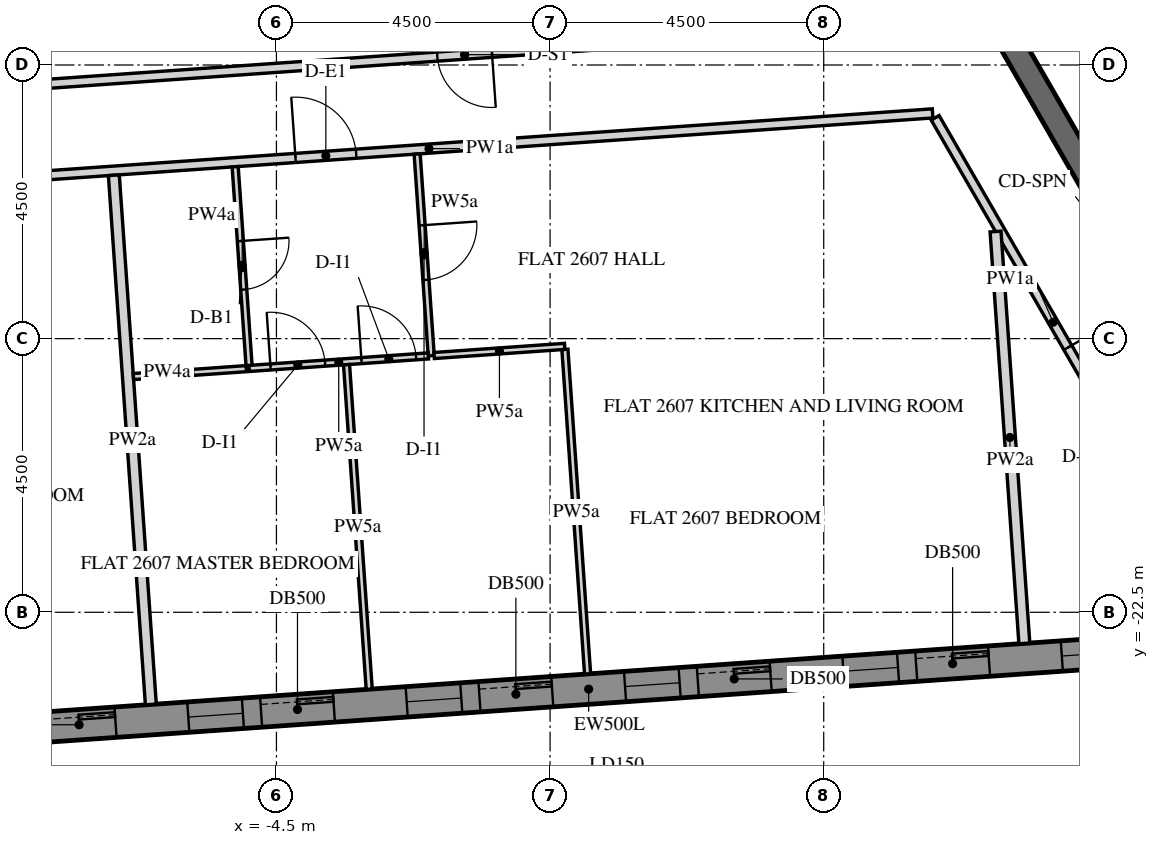
"""IFC4 building model, lengths in metres.
Left out: names, types, materials, properties, quantities, classifications, styles, units other than length and angle.
Written with IfcOpenShell. Run it as: python <this file> out.ifc"""

import sys

from ifc_helpers import new_model, si_unit, direction, frame, frame_2d, origin, place, context, subcontext, project, spatial, polyline, rectangle, outline, extrude, element, fill, save


model = new_model("IFC4")
c1 = context("Model", 3, precision=1e-05, world=origin(), true_north=direction((0.0, 1.0)))
c2 = subcontext(c1, "Body", "Model", "MODEL_VIEW")
j1 = project(units=[si_unit("LENGTHUNIT", "METRE"), si_unit("PLANEANGLEUNIT", "RADIAN")], contexts=[c1])
p1 = place(None, origin())
s1 = spatial("IfcSite", under=j1, at=p1, CompositionType="ELEMENT")
p2 = place(p1, origin())
s2 = spatial("IfcBuilding", under=s1, at=p2, CompositionType="ELEMENT")
p3 = place(p2, frame((0.0, 0.0, 326.4)))
s3 = spatial("IfcBuildingStorey", under=s2, at=p3, CompositionType="ELEMENT", Elevation=326.4)
p4 = place(p3, frame((-10.86, -24.567, -0.15), z_axis=(0.0, 0.0, 1.0), x_axis=(0.997564329317, 0.06975248292, 0.0)))
e1 = element("IfcWall", 1, at=p4, inside=s3, PredefinedType="SOLIDWALL", context=c2, shape_type="SweptSolid", body=[
    extrude(outline(polyline([(0.25, -0.25), (22.795, -0.25), (23.295, 0.25), (-0.25, 0.25), (0.25, -0.25)])), origin(), (0.0, 0.0, 1.0), 3.9),
])
p5 = place(p4, frame((1.323, 0.0, 1.05)))
e2 = element("IfcOpeningElement", 2, at=p5, cuts=e1, PredefinedType="OPENING", context=c2, shape_type="SweptSolid", body=[
    extrude(rectangle(XDim=0.9, YDim=1.5, at=frame_2d((0.45, 0.75))), frame((0.0, 0.26, 0.0), z_axis=(0.0, -1.0, 0.0), x_axis=(1.0, 0.0, 0.0)), (0.0, 0.0, 1.0), 0.52),
])
p6 = place(p4, frame((2.522, 0.0, 0.15)))
e3 = element("IfcOpeningElement", 3, at=p6, cuts=e1, PredefinedType="OPENING", context=c2, shape_type="SweptSolid", body=[
    extrude(rectangle(XDim=1.2, YDim=2.4, at=frame_2d((0.6, 1.2))), frame((0.0, 0.26, 0.0), z_axis=(0.0, -1.0, 0.0), x_axis=(1.0, 0.0, 0.0)), (0.0, 0.0, 1.0), 0.52),
])
p7 = place(p4, frame((4.922, 0.0, 1.05)))
e4 = element("IfcOpeningElement", 4, at=p7, cuts=e1, PredefinedType="OPENING", context=c2, shape_type="SweptSolid", body=[
    extrude(rectangle(XDim=0.9, YDim=1.5, at=frame_2d((0.45, 0.75))), frame((0.0, 0.26, 0.0), z_axis=(0.0, -1.0, 0.0), x_axis=(1.0, 0.0, 0.0)), (0.0, 0.0, 1.0), 0.52),
])
p8 = place(p4, frame((6.122, 0.0, 0.15)))
e5 = element("IfcOpeningElement", 5, at=p8, cuts=e1, PredefinedType="OPENING", context=c2, shape_type="SweptSolid", body=[
    extrude(rectangle(XDim=1.2, YDim=2.4, at=frame_2d((0.6, 1.2))), frame((0.0, 0.26, 0.0), z_axis=(0.0, -1.0, 0.0), x_axis=(1.0, 0.0, 0.0)), (0.0, 0.0, 1.0), 0.52),
])
p9 = place(p4, frame((8.522, 0.0, 1.05)))
e6 = element("IfcOpeningElement", 6, at=p9, cuts=e1, PredefinedType="OPENING", context=c2, shape_type="SweptSolid", body=[
    extrude(rectangle(XDim=0.9, YDim=1.5, at=frame_2d((0.45, 0.75))), frame((0.0, 0.26, 0.0), z_axis=(0.0, -1.0, 0.0), x_axis=(1.0, 0.0, 0.0)), (0.0, 0.0, 1.0), 0.52),
])
p10 = place(p4, frame((9.722, 0.0, 0.15)))
e7 = element("IfcOpeningElement", 7, at=p10, cuts=e1, PredefinedType="OPENING", context=c2, shape_type="SweptSolid", body=[
    extrude(rectangle(XDim=1.2, YDim=2.4, at=frame_2d((0.6, 1.2))), frame((0.0, 0.26, 0.0), z_axis=(0.0, -1.0, 0.0), x_axis=(1.0, 0.0, 0.0)), (0.0, 0.0, 1.0), 0.52),
])
p11 = place(p4, frame((12.122, 0.0, 1.05)))
e8 = element("IfcOpeningElement", 8, at=p11, cuts=e1, PredefinedType="OPENING", context=c2, shape_type="SweptSolid", body=[
    extrude(rectangle(XDim=0.9, YDim=1.5, at=frame_2d((0.45, 0.75))), frame((0.0, 0.26, 0.0), z_axis=(0.0, -1.0, 0.0), x_axis=(1.0, 0.0, 0.0)), (0.0, 0.0, 1.0), 0.52),
])
p12 = place(p4, frame((13.323, 0.0, 0.15)))
e9 = element("IfcOpeningElement", 9, at=p12, cuts=e1, PredefinedType="OPENING", context=c2, shape_type="SweptSolid", body=[
    extrude(rectangle(XDim=1.2, YDim=2.4, at=frame_2d((0.6, 1.2))), frame((0.0, 0.26, 0.0), z_axis=(0.0, -1.0, 0.0), x_axis=(1.0, 0.0, 0.0)), (0.0, 0.0, 1.0), 0.52),
])
p13 = place(p4, frame((15.722, 0.0, 1.05)))
e10 = element("IfcOpeningElement", 10, at=p13, cuts=e1, PredefinedType="OPENING", context=c2, shape_type="SweptSolid", body=[
    extrude(rectangle(XDim=0.9, YDim=1.5, at=frame_2d((0.45, 0.75))), frame((0.0, 0.26, 0.0), z_axis=(0.0, -1.0, 0.0), x_axis=(1.0, 0.0, 0.0)), (0.0, 0.0, 1.0), 0.52),
])
p14 = place(p4, frame((16.922, 0.0, 0.15)))
e11 = element("IfcOpeningElement", 11, at=p14, cuts=e1, PredefinedType="OPENING", context=c2, shape_type="SweptSolid", body=[
    extrude(rectangle(XDim=1.2, YDim=2.4, at=frame_2d((0.6, 1.2))), frame((0.0, 0.26, 0.0), z_axis=(0.0, -1.0, 0.0), x_axis=(1.0, 0.0, 0.0)), (0.0, 0.0, 1.0), 0.52),
])
p15 = place(p4, frame((19.323, 0.0, 1.05)))
e12 = element("IfcOpeningElement", 12, at=p15, cuts=e1, PredefinedType="OPENING", context=c2, shape_type="SweptSolid", body=[
    extrude(rectangle(XDim=0.9, YDim=1.5, at=frame_2d((0.45, 0.75))), frame((0.0, 0.26, 0.0), z_axis=(0.0, -1.0, 0.0), x_axis=(1.0, 0.0, 0.0)), (0.0, 0.0, 1.0), 0.52),
])
p16 = place(p4, frame((20.522, 0.0, 0.15)))
e13 = element("IfcOpeningElement", 13, at=p16, cuts=e1, PredefinedType="OPENING", context=c2, shape_type="SweptSolid", body=[
    extrude(rectangle(XDim=1.2, YDim=2.4, at=frame_2d((0.6, 1.2))), frame((0.0, 0.26, 0.0), z_axis=(0.0, -1.0, 0.0), x_axis=(1.0, 0.0, 0.0)), (0.0, 0.0, 1.0), 0.52),
])
p17 = place(p3, frame((6.351, -11.0, -0.15), z_axis=(0.0, 0.0, 1.0), x_axis=(0.499998894578, -0.866026041999, 0.0)))
e14 = element("IfcWall", 14, at=p17, inside=s3, PredefinedType="SHEAR", context=c2, shape_type="SweptSolid", body=[
    extrude(rectangle(XDim=15.544, YDim=0.4, at=frame_2d((7.772, 0.0))), origin(), (0.0, 0.0, 1.0), 3.9),
])
p18 = place(p17, frame((6.872, 0.0, 0.15)))
e15 = element("IfcOpeningElement", 15, at=p18, cuts=e14, PredefinedType="OPENING", context=c2, shape_type="SweptSolid", body=[
    extrude(rectangle(XDim=1.8, YDim=2.4, at=frame_2d((0.9, 1.2))), frame((0.0, 0.21, 0.0), z_axis=(0.0, -1.0, 0.0), x_axis=(1.0, 0.0, 0.0)), (0.0, 0.0, 1.0), 0.42),
])
p19 = place(p3, frame((-10.274, -15.454, 0.0), z_axis=(0.0, 0.0, 1.0), x_axis=(0.997563645223, 0.069762265797, 0.0)))
e16 = element("IfcWall", 16, at=p19, inside=s3, PredefinedType="PARTITIONING", context=c2, shape_type="SweptSolid", body=[
    extrude(rectangle(XDim=16.606, YDim=0.15, at=frame_2d((8.303, 0.0))), origin(), (0.0, 0.0, 1.0), 2.838),
])
p20 = place(p19, frame((6.103, 0.0, 0.0)))
e17 = element("IfcOpeningElement", 17, at=p20, cuts=e16, PredefinedType="OPENING", context=c2, shape_type="SweptSolid", body=[
    extrude(rectangle(XDim=1.0, YDim=2.1, at=frame_2d((0.5, 1.05))), frame((0.0, 0.085, 0.0), z_axis=(0.0, -1.0, 0.0), x_axis=(1.0, 0.0, 0.0)), (0.0, 0.0, 1.0), 0.17),
])
p21 = place(p3, frame((6.333, -14.368, 0.0), z_axis=(0.0, 0.0, 1.0), x_axis=(0.499977396983, -0.866038453249, 0.0)))
e18 = element("IfcWall", 18, at=p21, inside=s3, PredefinedType="PARTITIONING", context=c2, shape_type="SweptSolid", body=[
    extrude(rectangle(XDim=7.764, YDim=0.15, at=frame_2d((3.882, 0.0))), origin(), (0.0, 0.0, 1.0), 2.838),
])
p22 = place(p21, frame((4.364, 0.0, 0.0)))
e19 = element("IfcOpeningElement", 19, at=p22, cuts=e18, PredefinedType="OPENING", context=c2, shape_type="SweptSolid", body=[
    extrude(rectangle(XDim=1.0, YDim=2.1, at=frame_2d((0.5, 1.05))), frame((0.0, 0.085, 0.0), z_axis=(0.0, -1.0, 0.0), x_axis=(1.0, 0.0, 0.0)), (0.0, 0.0, 1.0), 0.17),
])
p23 = place(p3, frame((6.717, -12.762, 0.0), z_axis=(0.0, 0.0, 1.0), x_axis=(-0.99756375843, -0.069760646978, 0.0)))
e20 = element("IfcWall", 20, at=p23, inside=s3, PredefinedType="PARTITIONING", context=c2, shape_type="SweptSolid", body=[
    extrude(rectangle(XDim=16.284, YDim=0.15, at=frame_2d((8.142, 0.0))), origin(), (0.0, 0.0, 1.0), 2.838),
])
p24 = place(p23, frame((7.692, 0.0, 0.0)))
e21 = element("IfcOpeningElement", 21, at=p24, cuts=e20, PredefinedType="OPENING", context=c2, shape_type="SweptSolid", body=[
    extrude(rectangle(XDim=0.9, YDim=2.1, at=frame_2d((0.45, 1.05))), frame((0.0, 0.085, 0.0), z_axis=(0.0, -1.0, 0.0), x_axis=(1.0, 0.0, 0.0)), (0.0, 0.0, 1.0), 0.17),
])
p25 = place(p3, frame((-6.565, -24.017, 0.0), z_axis=(0.0, 0.0, 1.0), x_axis=(-0.06975756604, 0.997563973878, 0.0)))
e22 = element("IfcWall", 22, at=p25, inside=s3, PredefinedType="PARTITIONING", context=c2, shape_type="SweptSolid", body=[
    extrude(rectangle(XDim=8.725, YDim=0.18, at=frame_2d((4.363, 0.0))), origin(), (0.0, 0.0, 1.0), 2.838),
])
p26 = place(p3, frame((-2.186, -14.964, 0.0), z_axis=(0.0, 0.0, 1.0), x_axis=(0.069754598287, -0.997564181403, 0.0)))
e23 = element("IfcWall", 23, at=p26, inside=s3, PredefinedType="PARTITIONING", context=c2, shape_type="SweptSolid", body=[
    extrude(rectangle(XDim=3.325, YDim=0.1, at=frame_2d((1.663, 0.0))), origin(), (0.0, 0.0, 1.0), 2.838),
])
p27 = place(p26, frame((1.175, 0.0, 0.0)))
e24 = element("IfcOpeningElement", 24, at=p27, cuts=e23, PredefinedType="OPENING", context=c2, shape_type="SweptSolid", body=[
    extrude(rectangle(XDim=0.9, YDim=2.1, at=frame_2d((0.45, 1.05))), frame((0.0, 0.06, 0.0), z_axis=(0.0, -1.0, 0.0), x_axis=(1.0, 0.0, 0.0)), (0.0, 0.0, 1.0), 0.12),
])
p28 = place(p3, frame((-1.906, -18.278, 0.0), z_axis=(0.0, 0.0, 1.0), x_axis=(0.997563548072, 0.069763654999, 0.0)))
e25 = element("IfcWall", 25, at=p28, inside=s3, PredefinedType="PARTITIONING", context=c2, shape_type="SweptSolid", body=[
    extrude(rectangle(XDim=2.152, YDim=0.1, at=frame_2d((1.076, 0.0))), origin(), (0.0, 0.0, 1.0), 2.838),
])
p29 = place(p3, frame((0.244, -18.177, 0.0), z_axis=(0.0, 0.0, 1.0), x_axis=(0.069729221413, -0.997565955554, 0.0)))
e26 = element("IfcWall", 26, at=p29, inside=s3, PredefinedType="PARTITIONING", context=c2, shape_type="SweptSolid", body=[
    extrude(rectangle(XDim=5.35, YDim=0.1, at=frame_2d((2.675, 0.0))), origin(), (0.0, 0.0, 1.0), 2.838),
])
p30 = place(p3, frame((7.8, -23.012, 0.0), z_axis=(0.0, 0.0, 1.0), x_axis=(-0.069757205717, 0.997563999075, 0.0)))
e27 = element("IfcWall", 27, at=p30, inside=s3, PredefinedType="PARTITIONING", context=c2, shape_type="SweptSolid", body=[
    extrude(rectangle(XDim=6.79, YDim=0.18, at=frame_2d((3.395, 0.0))), origin(), (0.0, 0.0, 1.0), 2.838),
])
p31 = place(p3, frame((-5.179, -15.173, 0.0), z_axis=(0.0, 0.0, 1.0), x_axis=(0.069754598287, -0.997564181403, 0.0)))
e28 = element("IfcWall", 28, at=p31, inside=s3, PredefinedType="PARTITIONING", context=c2, shape_type="SweptSolid", body=[
    extrude(rectangle(XDim=3.325, YDim=0.1, at=frame_2d((1.663, 0.0))), origin(), (0.0, 0.0, 1.0), 2.838),
])
p32 = place(p31, frame((1.225, 0.0, 0.0)))
e29 = element("IfcOpeningElement", 29, at=p32, cuts=e28, PredefinedType="OPENING", context=c2, shape_type="SweptSolid", body=[
    extrude(rectangle(XDim=0.8, YDim=2.1, at=frame_2d((0.4, 1.05))), frame((0.0, 0.06, 0.0), z_axis=(0.0, -1.0, 0.0), x_axis=(1.0, 0.0, 0.0)), (0.0, 0.0, 1.0), 0.12),
])
p33 = place(p3, frame((-4.949, -18.49, 0.0), z_axis=(0.0, 0.0, 1.0), x_axis=(0.997564145845, 0.069755106801, 0.0)))
e30 = element("IfcWall", 30, at=p33, inside=s3, PredefinedType="PARTITIONING", context=c2, shape_type="SweptSolid", body=[
    extrude(rectangle(XDim=2.954, YDim=0.1, at=frame_2d((1.477, 0.0))), origin(), (0.0, 0.0, 1.0), 2.838),
])
p34 = place(p33, frame((0.352, 0.0, 0.0)))
e31 = element("IfcOpeningElement", 31, at=p34, cuts=e30, PredefinedType="OPENING", context=c2, shape_type="SweptSolid", body=[
    extrude(rectangle(XDim=0.9, YDim=2.1, at=frame_2d((0.45, 1.05))), frame((0.0, 0.06, 0.0), z_axis=(0.0, -1.0, 0.0), x_axis=(1.0, 0.0, 0.0)), (0.0, 0.0, 1.0), 0.12),
])
p35 = place(p33, frame((1.852, 0.0, 0.0)))
e32 = element("IfcOpeningElement", 32, at=p35, cuts=e30, PredefinedType="OPENING", context=c2, shape_type="SweptSolid", body=[
    extrude(rectangle(XDim=0.9, YDim=2.1, at=frame_2d((0.45, 1.05))), frame((0.0, 0.06, 0.0), z_axis=(0.0, -1.0, 0.0), x_axis=(1.0, 0.0, 0.0)), (0.0, 0.0, 1.0), 0.12),
])
p36 = place(p3, frame((-6.852, -18.623, 0.0), z_axis=(0.0, 0.0, 1.0), x_axis=(0.997564079323, 0.069756058123, 0.0)))
e33 = element("IfcWall", 33, at=p36, inside=s3, PredefinedType="PARTITIONING", context=c2, shape_type="SweptSolid", body=[
    extrude(rectangle(XDim=1.862, YDim=0.1, at=frame_2d((0.931, 0.0))), origin(), (0.0, 0.0, 1.0), 2.838),
])
p37 = place(p3, frame((-2.974, -23.765, 0.0), z_axis=(0.0, 0.0, 1.0), x_axis=(-0.069774633622, 0.997562780231, 0.0)))
e34 = element("IfcWall", 34, at=p37, inside=s3, PredefinedType="PARTITIONING", context=c2, shape_type="SweptSolid", body=[
    extrude(rectangle(XDim=5.35, YDim=0.1, at=frame_2d((2.675, 0.0))), origin(), (0.0, 0.0, 1.0), 2.838),
])
p38 = place(p6, frame((0.0, 0.175, 0.0)))
e35 = element("IfcDoor", 35, at=p38, inside=s3, OperationType="SLIDING_TO_LEFT", PredefinedType="DOOR", context=c2, shape_type="SweptSolid", body=[
    extrude(rectangle(XDim=1.2, YDim=2.4, at=frame_2d((0.6, 1.2))), frame((0.0, 0.025, 0.0), z_axis=(0.0, -1.0, 0.0), x_axis=(1.0, 0.0, 0.0)), (0.0, 0.0, 1.0), 0.05),
])
fill(e3, e35)
p39 = place(p7, frame((0.0, 0.18, 0.0)))
e36 = element("IfcWindow", 36, at=p39, inside=s3, PartitioningType="SINGLE_PANEL", PredefinedType="WINDOW", context=c2, shape_type="SweptSolid", body=[
    extrude(rectangle(XDim=0.9, YDim=1.5, at=frame_2d((0.45, 0.75))), frame((0.0, 0.03, 0.0), z_axis=(0.0, -1.0, 0.0), x_axis=(1.0, 0.0, 0.0)), (0.0, 0.0, 1.0), 0.06),
])
fill(e4, e36)
p40 = place(p8, frame((0.0, 0.175, 0.0)))
e37 = element("IfcDoor", 37, at=p40, inside=s3, OperationType="SLIDING_TO_LEFT", PredefinedType="DOOR", context=c2, shape_type="SweptSolid", body=[
    extrude(rectangle(XDim=1.2, YDim=2.4, at=frame_2d((0.6, 1.2))), frame((0.0, 0.025, 0.0), z_axis=(0.0, -1.0, 0.0), x_axis=(1.0, 0.0, 0.0)), (0.0, 0.0, 1.0), 0.05),
])
fill(e5, e37)
p41 = place(p9, frame((0.0, 0.18, 0.0)))
e38 = element("IfcWindow", 38, at=p41, inside=s3, PartitioningType="SINGLE_PANEL", PredefinedType="WINDOW", context=c2, shape_type="SweptSolid", body=[
    extrude(rectangle(XDim=0.9, YDim=1.5, at=frame_2d((0.45, 0.75))), frame((0.0, 0.03, 0.0), z_axis=(0.0, -1.0, 0.0), x_axis=(1.0, 0.0, 0.0)), (0.0, 0.0, 1.0), 0.06),
])
fill(e6, e38)
p42 = place(p10, frame((0.0, 0.175, 0.0)))
e39 = element("IfcDoor", 39, at=p42, inside=s3, OperationType="SLIDING_TO_LEFT", PredefinedType="DOOR", context=c2, shape_type="SweptSolid", body=[
    extrude(rectangle(XDim=1.2, YDim=2.4, at=frame_2d((0.6, 1.2))), frame((0.0, 0.025, 0.0), z_axis=(0.0, -1.0, 0.0), x_axis=(1.0, 0.0, 0.0)), (0.0, 0.0, 1.0), 0.05),
])
fill(e7, e39)
p43 = place(p11, frame((0.0, 0.18, 0.0)))
e40 = element("IfcWindow", 40, at=p43, inside=s3, PartitioningType="SINGLE_PANEL", PredefinedType="WINDOW", context=c2, shape_type="SweptSolid", body=[
    extrude(rectangle(XDim=0.9, YDim=1.5, at=frame_2d((0.45, 0.75))), frame((0.0, 0.03, 0.0), z_axis=(0.0, -1.0, 0.0), x_axis=(1.0, 0.0, 0.0)), (0.0, 0.0, 1.0), 0.06),
])
fill(e8, e40)
p44 = place(p12, frame((0.0, 0.175, 0.0)))
e41 = element("IfcDoor", 41, at=p44, inside=s3, OperationType="SLIDING_TO_LEFT", PredefinedType="DOOR", context=c2, shape_type="SweptSolid", body=[
    extrude(rectangle(XDim=1.2, YDim=2.4, at=frame_2d((0.6, 1.2))), frame((0.0, 0.025, 0.0), z_axis=(0.0, -1.0, 0.0), x_axis=(1.0, 0.0, 0.0)), (0.0, 0.0, 1.0), 0.05),
])
fill(e9, e41)
p45 = place(p13, frame((0.0, 0.18, 0.0)))
e42 = element("IfcWindow", 42, at=p45, inside=s3, PartitioningType="SINGLE_PANEL", PredefinedType="WINDOW", context=c2, shape_type="SweptSolid", body=[
    extrude(rectangle(XDim=0.9, YDim=1.5, at=frame_2d((0.45, 0.75))), frame((0.0, 0.03, 0.0), z_axis=(0.0, -1.0, 0.0), x_axis=(1.0, 0.0, 0.0)), (0.0, 0.0, 1.0), 0.06),
])
fill(e10, e42)
p46 = place(p14, frame((0.0, 0.175, 0.0)))
e43 = element("IfcDoor", 43, at=p46, inside=s3, OperationType="SLIDING_TO_LEFT", PredefinedType="DOOR", context=c2, shape_type="SweptSolid", body=[
    extrude(rectangle(XDim=1.2, YDim=2.4, at=frame_2d((0.6, 1.2))), frame((0.0, 0.025, 0.0), z_axis=(0.0, -1.0, 0.0), x_axis=(1.0, 0.0, 0.0)), (0.0, 0.0, 1.0), 0.05),
])
fill(e11, e43)
p47 = place(p15, frame((0.0, 0.18, 0.0)))
e44 = element("IfcWindow", 44, at=p47, inside=s3, PartitioningType="SINGLE_PANEL", PredefinedType="WINDOW", context=c2, shape_type="SweptSolid", body=[
    extrude(rectangle(XDim=0.9, YDim=1.5, at=frame_2d((0.45, 0.75))), frame((0.0, 0.03, 0.0), z_axis=(0.0, -1.0, 0.0), x_axis=(1.0, 0.0, 0.0)), (0.0, 0.0, 1.0), 0.06),
])
fill(e12, e44)
p48 = place(p20, origin())
e45 = element("IfcDoor", 45, at=p48, inside=s3, OperationType="SINGLE_SWING_RIGHT", PredefinedType="DOOR", context=c2, shape_type="SweptSolid", body=[
    extrude(rectangle(XDim=1.0, YDim=2.1, at=frame_2d((0.5, 1.05))), frame((0.0, 0.025, 0.0), z_axis=(0.0, -1.0, 0.0), x_axis=(1.0, 0.0, 0.0)), (0.0, 0.0, 1.0), 0.05),
])
fill(e17, e45)
p49 = place(p32, origin())
e46 = element("IfcDoor", 46, at=p49, inside=s3, OperationType="SINGLE_SWING_RIGHT", PredefinedType="DOOR", context=c2, shape_type="SweptSolid", body=[
    extrude(rectangle(XDim=0.8, YDim=2.1, at=frame_2d((0.4, 1.05))), frame((0.0, 0.025, 0.0), z_axis=(0.0, -1.0, 0.0), x_axis=(1.0, 0.0, 0.0)), (0.0, 0.0, 1.0), 0.05),
])
fill(e29, e46)
p50 = place(p27, origin())
e47 = element("IfcDoor", 47, at=p50, inside=s3, OperationType="SINGLE_SWING_RIGHT", PredefinedType="DOOR", context=c2, shape_type="SweptSolid", body=[
    extrude(rectangle(XDim=0.9, YDim=2.1, at=frame_2d((0.45, 1.05))), frame((0.0, 0.025, 0.0), z_axis=(0.0, -1.0, 0.0), x_axis=(1.0, 0.0, 0.0)), (0.0, 0.0, 1.0), 0.05),
])
fill(e24, e47)
p51 = place(p34, origin())
e48 = element("IfcDoor", 48, at=p51, inside=s3, OperationType="SINGLE_SWING_RIGHT", PredefinedType="DOOR", context=c2, shape_type="SweptSolid", body=[
    extrude(rectangle(XDim=0.9, YDim=2.1, at=frame_2d((0.45, 1.05))), frame((0.0, 0.025, 0.0), z_axis=(0.0, -1.0, 0.0), x_axis=(1.0, 0.0, 0.0)), (0.0, 0.0, 1.0), 0.05),
])
fill(e31, e48)
p52 = place(p35, origin())
e49 = element("IfcDoor", 49, at=p52, inside=s3, OperationType="SINGLE_SWING_LEFT", PredefinedType="DOOR", context=c2, shape_type="SweptSolid", body=[
    extrude(rectangle(XDim=0.9, YDim=2.1, at=frame_2d((0.45, 1.05))), frame((0.0, 0.025, 0.0), z_axis=(0.0, -1.0, 0.0), x_axis=(1.0, 0.0, 0.0)), (0.0, 0.0, 1.0), 0.05),
])
fill(e32, e49)
p53 = place(p22, origin())
e50 = element("IfcDoor", 50, at=p53, inside=s3, OperationType="SINGLE_SWING_RIGHT", PredefinedType="DOOR", context=c2, shape_type="SweptSolid", body=[
    extrude(rectangle(XDim=1.0, YDim=2.1, at=frame_2d((0.5, 1.05))), frame((0.0, 0.025, 0.0), z_axis=(0.0, -1.0, 0.0), x_axis=(1.0, 0.0, 0.0)), (0.0, 0.0, 1.0), 0.05),
])
fill(e19, e50)
p54 = place(p24, origin())
e51 = element("IfcDoor", 51, at=p54, inside=s3, OperationType="SINGLE_SWING_RIGHT", PredefinedType="DOOR", context=c2, shape_type="SweptSolid", body=[
    extrude(rectangle(XDim=0.9, YDim=2.1, at=frame_2d((0.45, 1.05))), frame((0.0, 0.025, 0.0), z_axis=(0.0, -1.0, 0.0), x_axis=(1.0, 0.0, 0.0)), (0.0, 0.0, 1.0), 0.05),
])
fill(e21, e51)
save(model, sys.argv[1])
